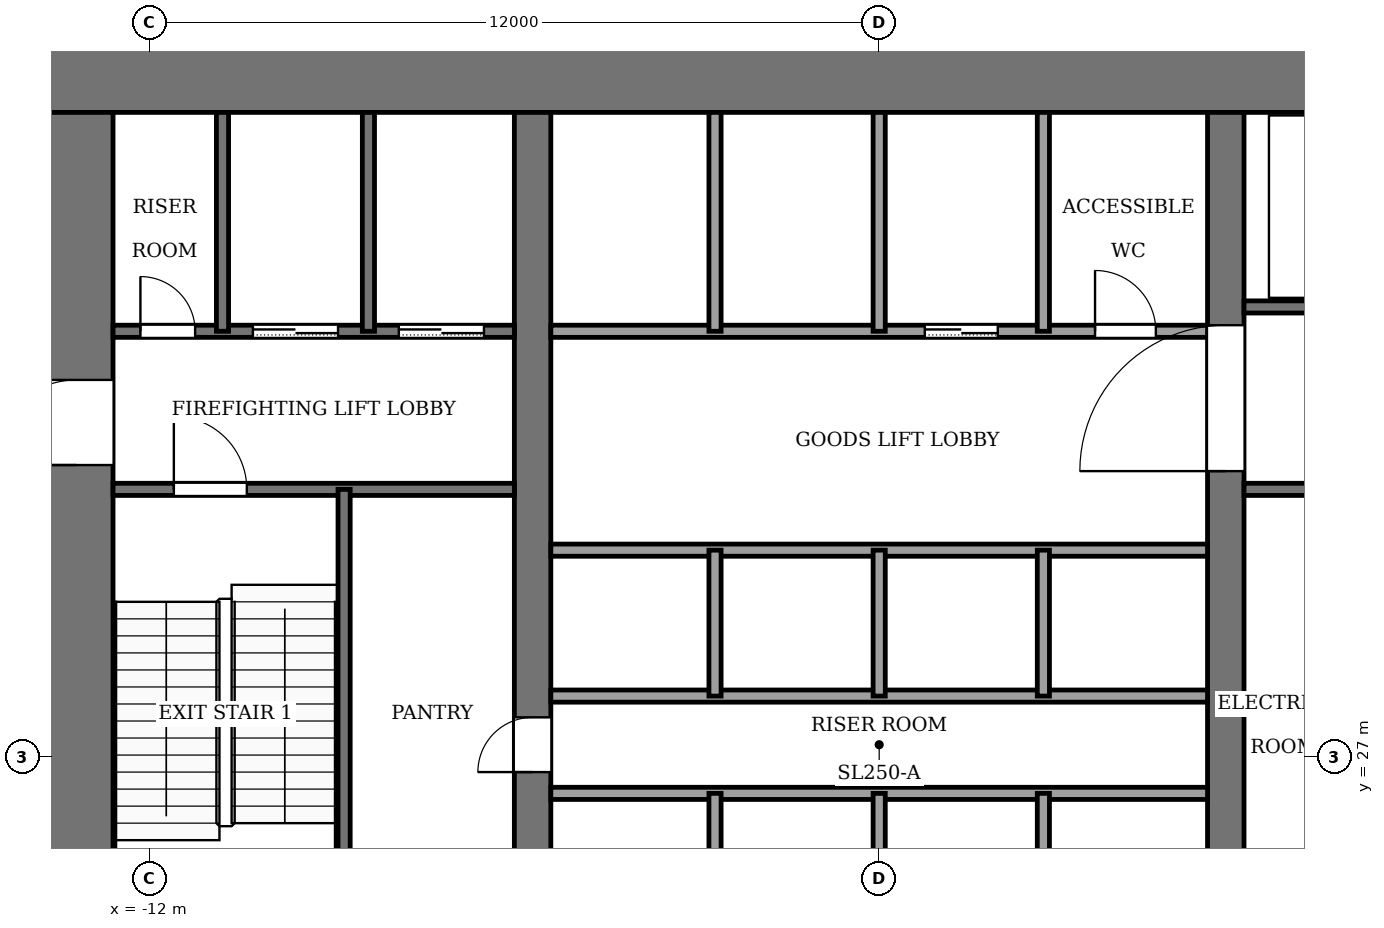
"""IFC4 building model, lengths in metres.
Left out: names, types, materials, properties, quantities, classifications, styles, units other than length and angle.
Written with IfcOpenShell. Run it as: python <this file> out.ifc"""

import sys

from ifc_helpers import new_model, si_unit, direction, frame, frame_2d, origin, place, context, subcontext, project, spatial, rectangle, extrude, element, fill, save


model = new_model("IFC4")
c1 = context("Model", 3, precision=1e-05, world=origin(), true_north=direction((0.0, 1.0)))
c2 = subcontext(c1, "Body", "Model", "MODEL_VIEW")
j1 = project(units=[si_unit("LENGTHUNIT", "METRE"), si_unit("PLANEANGLEUNIT", "RADIAN")], contexts=[c1])
p1 = place(None, origin())
s1 = spatial("IfcSite", under=j1, at=p1, CompositionType="ELEMENT")
p2 = place(p1, origin())
s2 = spatial("IfcBuilding", under=s1, at=p2, CompositionType="ELEMENT")
p3 = place(p2, frame((0.0, 0.0, 65.0)))
s3 = spatial("IfcBuildingStorey", under=s2, at=p3, CompositionType="ELEMENT", Elevation=65.0)
p4 = place(p3, frame((-13.8, 38.2, -0.13), z_axis=(0.0, 0.0, 1.0), x_axis=(1.0, 0.0, 0.0)))
e1 = element("IfcWall", 1, at=p4, inside=s3, PredefinedType="SHEAR", context=c2, shape_type="SweptSolid", body=[
    extrude(rectangle(XDim=27.6, YDim=1.2, at=frame_2d((13.8, 0.0))), origin(), (0.0, 0.0, 1.0), 5.0),
])
p5 = place(p3, frame((-13.2, 18.4, -0.13), z_axis=(0.0, 0.0, 1.0), x_axis=(0.0, 1.0, 0.0)))
e2 = element("IfcWall", 2, at=p5, inside=s3, PredefinedType="SHEAR", context=c2, shape_type="SweptSolid", body=[
    extrude(rectangle(XDim=19.2, YDim=1.2, at=frame_2d((9.6, 0.0))), origin(), (0.0, 0.0, 1.0), 5.0),
])
p6 = place(p5, frame((2.8, 0.0, 0.13)))
e3 = element("IfcOpeningElement", 3, at=p6, cuts=e2, PredefinedType="OPENING", context=c2, shape_type="SweptSolid", body=[
    extrude(rectangle(XDim=2.4, YDim=2.4, at=frame_2d((1.2, 1.2))), frame((0.0, 0.61, 0.0), z_axis=(0.0, -1.0, 0.0), x_axis=(1.0, 0.0, 0.0)), (0.0, 0.0, 1.0), 1.22),
])
p7 = place(p5, frame((13.4, 0.0, 0.13)))
e4 = element("IfcOpeningElement", 4, at=p7, cuts=e2, PredefinedType="OPENING", context=c2, shape_type="SweptSolid", body=[
    extrude(rectangle(XDim=1.4, YDim=2.2, at=frame_2d((0.7, 1.1))), frame((0.0, 0.61, 0.0), z_axis=(0.0, -1.0, 0.0), x_axis=(1.0, 0.0, 0.0)), (0.0, 0.0, 1.0), 1.22),
])
p8 = place(p3, frame((-5.7, 18.4, -0.13), z_axis=(0.0, 0.0, 1.0), x_axis=(0.0, 1.0, 0.0)))
e5 = element("IfcWall", 5, at=p8, inside=s3, PredefinedType="SHEAR", context=c2, shape_type="SweptSolid", body=[
    extrude(rectangle(XDim=19.2, YDim=0.6, at=frame_2d((9.6, 0.0))), origin(), (0.0, 0.0, 1.0), 5.0),
])
p9 = place(p8, frame((8.35, 0.0, 0.13)))
e6 = element("IfcOpeningElement", 6, at=p9, cuts=e5, PredefinedType="OPENING", context=c2, shape_type="SweptSolid", body=[
    extrude(rectangle(XDim=0.9, YDim=2.1, at=frame_2d((0.45, 1.05))), frame((0.0, 0.31, 0.0), z_axis=(0.0, -1.0, 0.0), x_axis=(1.0, 0.0, 0.0)), (0.0, 0.0, 1.0), 0.62),
])
p10 = place(p3, frame((5.7, 18.4, -0.13), z_axis=(0.0, 0.0, 1.0), x_axis=(0.0, 1.0, 0.0)))
e7 = element("IfcWall", 7, at=p10, inside=s3, PredefinedType="SHEAR", context=c2, shape_type="SweptSolid", body=[
    extrude(rectangle(XDim=19.2, YDim=0.6, at=frame_2d((9.6, 0.0))), origin(), (0.0, 0.0, 1.0), 5.0),
])
p11 = place(p10, frame((13.3, 0.0, 0.13)))
e8 = element("IfcOpeningElement", 8, at=p11, cuts=e7, PredefinedType="OPENING", context=c2, shape_type="SweptSolid", body=[
    extrude(rectangle(XDim=2.4, YDim=2.4, at=frame_2d((1.2, 1.2))), frame((0.0, 0.31, 0.0), z_axis=(0.0, -1.0, 0.0), x_axis=(1.0, 0.0, 0.0)), (0.0, 0.0, 1.0), 0.62),
])
for number, where, z_axis, x_axis in (
    (9, (-5.4, 26.4, 0.0), (0.0, 0.0, 1.0), (1.0, 0.0, 0.0)),
    (10, (-5.4, 28.0, 0.0), (0.0, 0.0, 1.0), (1.0, 0.0, 0.0)),
    (11, (-5.4, 30.4, 0.0), (0.0, 0.0, 1.0), (1.0, 0.0, 0.0)),
):
    element("IfcWall", number, at=place(p3, frame(where, z_axis=z_axis, x_axis=x_axis)), inside=s3, PredefinedType="PARTITIONING", context=c2, shape_type="SweptSolid", body=[
        extrude(rectangle(XDim=10.8, YDim=0.2, at=frame_2d((5.4, 0.0))), origin(), (0.0, 0.0, 1.0), 4.87),
    ])
p12 = place(p3, frame((-12.6, 31.4, 0.0), z_axis=(0.0, 0.0, 1.0), x_axis=(1.0, 0.0, 0.0)))
e12 = element("IfcWall", 12, at=p12, inside=s3, PredefinedType="PARTITIONING", context=c2, shape_type="SweptSolid", body=[
    extrude(rectangle(XDim=6.6, YDim=0.2, at=frame_2d((3.3, 0.0))), origin(), (0.0, 0.0, 1.0), 4.87),
])
p13 = place(p12, frame((1.0, 0.0, 0.0)))
e13 = element("IfcOpeningElement", 13, at=p13, cuts=e12, PredefinedType="OPENING", context=c2, shape_type="SweptSolid", body=[
    extrude(rectangle(XDim=1.2, YDim=2.2, at=frame_2d((0.6, 1.1))), frame((0.0, 0.11, 0.0), z_axis=(0.0, -1.0, 0.0), x_axis=(1.0, 0.0, 0.0)), (0.0, 0.0, 1.0), 0.22),
])
p14 = place(p3, frame((6.0, 31.4, 0.0), z_axis=(0.0, 0.0, 1.0), x_axis=(1.0, 0.0, 0.0)))
e14 = element("IfcWall", 14, at=p14, inside=s3, PredefinedType="PARTITIONING", context=c2, shape_type="SweptSolid", body=[
    extrude(rectangle(XDim=6.6, YDim=0.2, at=frame_2d((3.3, 0.0))), origin(), (0.0, 0.0, 1.0), 4.87),
])
p15 = place(p3, frame((-12.6, 34.0, 0.0), z_axis=(0.0, 0.0, 1.0), x_axis=(1.0, 0.0, 0.0)))
e15 = element("IfcWall", 15, at=p15, inside=s3, PredefinedType="PARTITIONING", context=c2, shape_type="SweptSolid", body=[
    extrude(rectangle(XDim=6.6, YDim=0.2, at=frame_2d((3.3, 0.0))), origin(), (0.0, 0.0, 1.0), 4.87),
])
p16 = place(p15, frame((4.7, 0.0, 0.0)))
e16 = element("IfcOpeningElement", 16, at=p16, cuts=e15, PredefinedType="OPENING", context=c2, shape_type="SweptSolid", body=[
    extrude(rectangle(XDim=1.4, YDim=2.2, at=frame_2d((0.7, 1.1))), frame((0.0, 0.11, 0.0), z_axis=(0.0, -1.0, 0.0), x_axis=(1.0, 0.0, 0.0)), (0.0, 0.0, 1.0), 0.22),
])
p17 = place(p15, frame((2.3, 0.0, 0.0)))
e17 = element("IfcOpeningElement", 17, at=p17, cuts=e15, PredefinedType="OPENING", context=c2, shape_type="SweptSolid", body=[
    extrude(rectangle(XDim=1.4, YDim=2.2, at=frame_2d((0.7, 1.1))), frame((0.0, 0.11, 0.0), z_axis=(0.0, -1.0, 0.0), x_axis=(1.0, 0.0, 0.0)), (0.0, 0.0, 1.0), 0.22),
])
p18 = place(p15, frame((0.45, 0.0, 0.0)))
e18 = element("IfcOpeningElement", 18, at=p18, cuts=e15, PredefinedType="OPENING", context=c2, shape_type="SweptSolid", body=[
    extrude(rectangle(XDim=0.9, YDim=2.1, at=frame_2d((0.45, 1.05))), frame((0.0, 0.11, 0.0), z_axis=(0.0, -1.0, 0.0), x_axis=(1.0, 0.0, 0.0)), (0.0, 0.0, 1.0), 0.22),
])
p19 = place(p3, frame((-5.4, 34.0, 0.0), z_axis=(0.0, 0.0, 1.0), x_axis=(1.0, 0.0, 0.0)))
e19 = element("IfcWall", 19, at=p19, inside=s3, PredefinedType="PARTITIONING", context=c2, shape_type="SweptSolid", body=[
    extrude(rectangle(XDim=10.8, YDim=0.2, at=frame_2d((5.4, 0.0))), origin(), (0.0, 0.0, 1.0), 4.87),
])
p20 = place(p19, frame((6.15, 0.0, 0.0)))
e20 = element("IfcOpeningElement", 20, at=p20, cuts=e19, PredefinedType="OPENING", context=c2, shape_type="SweptSolid", body=[
    extrude(rectangle(XDim=1.2, YDim=2.2, at=frame_2d((0.6, 1.1))), frame((0.0, 0.11, 0.0), z_axis=(0.0, -1.0, 0.0), x_axis=(1.0, 0.0, 0.0)), (0.0, 0.0, 1.0), 0.22),
])
p21 = place(p19, frame((8.95, 0.0, 0.0)))
e21 = element("IfcOpeningElement", 21, at=p21, cuts=e19, PredefinedType="OPENING", context=c2, shape_type="SweptSolid", body=[
    extrude(rectangle(XDim=1.0, YDim=2.1, at=frame_2d((0.5, 1.05))), frame((0.0, 0.11, 0.0), z_axis=(0.0, -1.0, 0.0), x_axis=(1.0, 0.0, 0.0)), (0.0, 0.0, 1.0), 0.22),
])
p22 = place(p3, frame((6.0, 34.4, 0.0), z_axis=(0.0, 0.0, 1.0), x_axis=(1.0, 0.0, 0.0)))
e22 = element("IfcWall", 22, at=p22, inside=s3, PredefinedType="PARTITIONING", context=c2, shape_type="SweptSolid", body=[
    extrude(rectangle(XDim=6.6, YDim=0.2, at=frame_2d((3.3, 0.0))), origin(), (0.0, 0.0, 1.0), 4.87),
])
p23 = place(p22, frame((4.8, 0.0, 0.0)))
e23 = element("IfcOpeningElement", 23, at=p23, cuts=e22, PredefinedType="OPENING", context=c2, shape_type="SweptSolid", body=[
    extrude(rectangle(XDim=1.2, YDim=2.2, at=frame_2d((0.6, 1.1))), frame((0.0, 0.11, 0.0), z_axis=(0.0, -1.0, 0.0), x_axis=(1.0, 0.0, 0.0)), (0.0, 0.0, 1.0), 0.22),
])
p24 = place(p3, frame((-10.8, 34.0, 0.0), z_axis=(0.0, 0.0, 1.0), x_axis=(0.0, 1.0, 0.0)))
e24 = element("IfcWall", 24, at=p24, inside=s3, PredefinedType="PARTITIONING", context=c2, shape_type="SweptSolid", body=[
    extrude(rectangle(XDim=3.6, YDim=0.2, at=frame_2d((1.8, 0.0))), origin(), (0.0, 0.0, 1.0), 4.87),
])
p25 = place(p3, frame((-8.8, 24.0, 0.0), z_axis=(0.0, 0.0, 1.0), x_axis=(0.0, 1.0, 0.0)))
e25 = element("IfcWall", 25, at=p25, inside=s3, PredefinedType="PARTITIONING", context=c2, shape_type="SweptSolid", body=[
    extrude(rectangle(XDim=7.4, YDim=0.2, at=frame_2d((3.7, 0.0))), origin(), (0.0, 0.0, 1.0), 4.87),
])
p26 = place(p3, frame((-8.4, 34.0, 0.0), z_axis=(0.0, 0.0, 1.0), x_axis=(0.0, 1.0, 0.0)))
e26 = element("IfcWall", 26, at=p26, inside=s3, PredefinedType="PARTITIONING", context=c2, shape_type="SweptSolid", body=[
    extrude(rectangle(XDim=3.6, YDim=0.2, at=frame_2d((1.8, 0.0))), origin(), (0.0, 0.0, 1.0), 4.87),
])
for number, where, z_axis, x_axis in (
    (27, (-2.7, 24.0, 0.0), (0.0, 0.0, 1.0), (0.0, 1.0, 0.0)),
    (28, (-2.7, 28.0, 0.0), (0.0, 0.0, 1.0), (0.0, 1.0, 0.0)),
):
    element("IfcWall", number, at=place(p3, frame(where, z_axis=z_axis, x_axis=x_axis)), inside=s3, PredefinedType="PARTITIONING", context=c2, shape_type="SweptSolid", body=[
        extrude(rectangle(XDim=2.4, YDim=0.2, at=frame_2d((1.2, 0.0))), origin(), (0.0, 0.0, 1.0), 4.87),
    ])
p27 = place(p3, frame((-2.7, 34.0, 0.0), z_axis=(0.0, 0.0, 1.0), x_axis=(0.0, 1.0, 0.0)))
e29 = element("IfcWall", 29, at=p27, inside=s3, PredefinedType="PARTITIONING", context=c2, shape_type="SweptSolid", body=[
    extrude(rectangle(XDim=3.6, YDim=0.2, at=frame_2d((1.8, 0.0))), origin(), (0.0, 0.0, 1.0), 4.87),
])
for number, where, z_axis, x_axis in (
    (30, (0.0, 24.0, 0.0), (0.0, 0.0, 1.0), (0.0, 1.0, 0.0)),
    (31, (0.0, 28.0, 0.0), (0.0, 0.0, 1.0), (0.0, 1.0, 0.0)),
):
    element("IfcWall", number, at=place(p3, frame(where, z_axis=z_axis, x_axis=x_axis)), inside=s3, PredefinedType="PARTITIONING", context=c2, shape_type="SweptSolid", body=[
        extrude(rectangle(XDim=2.4, YDim=0.2, at=frame_2d((1.2, 0.0))), origin(), (0.0, 0.0, 1.0), 4.87),
    ])
p28 = place(p3, frame((0.0, 34.0, 0.0), z_axis=(0.0, 0.0, 1.0), x_axis=(0.0, 1.0, 0.0)))
e32 = element("IfcWall", 32, at=p28, inside=s3, PredefinedType="PARTITIONING", context=c2, shape_type="SweptSolid", body=[
    extrude(rectangle(XDim=3.6, YDim=0.2, at=frame_2d((1.8, 0.0))), origin(), (0.0, 0.0, 1.0), 4.87),
])
for number, where, z_axis, x_axis in (
    (33, (2.7, 24.0, 0.0), (0.0, 0.0, 1.0), (0.0, 1.0, 0.0)),
    (34, (2.7, 28.0, 0.0), (0.0, 0.0, 1.0), (0.0, 1.0, 0.0)),
):
    element("IfcWall", number, at=place(p3, frame(where, z_axis=z_axis, x_axis=x_axis)), inside=s3, PredefinedType="PARTITIONING", context=c2, shape_type="SweptSolid", body=[
        extrude(rectangle(XDim=2.4, YDim=0.2, at=frame_2d((1.2, 0.0))), origin(), (0.0, 0.0, 1.0), 4.87),
    ])
p29 = place(p3, frame((2.7, 34.0, 0.0), z_axis=(0.0, 0.0, 1.0), x_axis=(0.0, 1.0, 0.0)))
e35 = element("IfcWall", 35, at=p29, inside=s3, PredefinedType="PARTITIONING", context=c2, shape_type="SweptSolid", body=[
    extrude(rectangle(XDim=3.6, YDim=0.2, at=frame_2d((1.8, 0.0))), origin(), (0.0, 0.0, 1.0), 4.87),
])
p30 = place(p20, origin())
e36 = element("IfcDoor", 36, at=p30, inside=s3, OperationType="SLIDING_TO_LEFT", PredefinedType="DOOR", context=c2, shape_type="SweptSolid", body=[
    extrude(rectangle(XDim=1.2, YDim=2.2, at=frame_2d((0.6, 1.1))), frame((0.0, 0.025, 0.0), z_axis=(0.0, -1.0, 0.0), x_axis=(1.0, 0.0, 0.0)), (0.0, 0.0, 1.0), 0.05),
])
fill(e20, e36)
p31 = place(p16, origin())
e37 = element("IfcDoor", 37, at=p31, inside=s3, OperationType="SLIDING_TO_LEFT", PredefinedType="DOOR", context=c2, shape_type="SweptSolid", body=[
    extrude(rectangle(XDim=1.4, YDim=2.2, at=frame_2d((0.7, 1.1))), frame((0.0, 0.025, 0.0), z_axis=(0.0, -1.0, 0.0), x_axis=(1.0, 0.0, 0.0)), (0.0, 0.0, 1.0), 0.05),
])
fill(e16, e37)
p32 = place(p17, origin())
e38 = element("IfcDoor", 38, at=p32, inside=s3, OperationType="SLIDING_TO_LEFT", PredefinedType="DOOR", context=c2, shape_type="SweptSolid", body=[
    extrude(rectangle(XDim=1.4, YDim=2.2, at=frame_2d((0.7, 1.1))), frame((0.0, 0.025, 0.0), z_axis=(0.0, -1.0, 0.0), x_axis=(1.0, 0.0, 0.0)), (0.0, 0.0, 1.0), 0.05),
])
fill(e17, e38)
p33 = place(p18, origin())
e39 = element("IfcDoor", 39, at=p33, inside=s3, OperationType="SINGLE_SWING_RIGHT", PredefinedType="DOOR", context=c2, shape_type="SweptSolid", body=[
    extrude(rectangle(XDim=0.9, YDim=2.1, at=frame_2d((0.45, 1.05))), frame((0.0, 0.025, 0.0), z_axis=(0.0, -1.0, 0.0), x_axis=(1.0, 0.0, 0.0)), (0.0, 0.0, 1.0), 0.05),
])
fill(e18, e39)
p34 = place(p21, origin())
e40 = element("IfcDoor", 40, at=p34, inside=s3, OperationType="SINGLE_SWING_LEFT", PredefinedType="DOOR", context=c2, shape_type="SweptSolid", body=[
    extrude(rectangle(XDim=1.0, YDim=2.1, at=frame_2d((0.5, 1.05))), frame((0.0, 0.025, 0.0), z_axis=(0.0, -1.0, 0.0), x_axis=(1.0, 0.0, 0.0)), (0.0, 0.0, 1.0), 0.05),
])
fill(e21, e40)
p35 = place(p9, origin())
e41 = element("IfcDoor", 41, at=p35, inside=s3, OperationType="SINGLE_SWING_LEFT", PredefinedType="DOOR", context=c2, shape_type="SweptSolid", body=[
    extrude(rectangle(XDim=0.9, YDim=2.1, at=frame_2d((0.45, 1.05))), frame((0.0, 0.025, 0.0), z_axis=(0.0, -1.0, 0.0), x_axis=(1.0, 0.0, 0.0)), (0.0, 0.0, 1.0), 0.05),
])
fill(e6, e41)
p36 = place(p13, origin())
e42 = element("IfcDoor", 42, at=p36, inside=s3, OperationType="SINGLE_SWING_LEFT", PredefinedType="DOOR", context=c2, shape_type="SweptSolid", body=[
    extrude(rectangle(XDim=1.2, YDim=2.2, at=frame_2d((0.6, 1.1))), frame((0.0, 0.025, 0.0), z_axis=(0.0, -1.0, 0.0), x_axis=(1.0, 0.0, 0.0)), (0.0, 0.0, 1.0), 0.05),
])
fill(e13, e42)
p37 = place(p11, origin())
e43 = element("IfcDoor", 43, at=p37, inside=s3, OperationType="DOUBLE_DOOR_SINGLE_SWING", PredefinedType="DOOR", context=c2, shape_type="SweptSolid", body=[
    extrude(rectangle(XDim=2.4, YDim=2.4, at=frame_2d((1.2, 1.2))), frame((0.0, 0.025, 0.0), z_axis=(0.0, -1.0, 0.0), x_axis=(1.0, 0.0, 0.0)), (0.0, 0.0, 1.0), 0.05),
])
fill(e8, e43)
p38 = place(p7, origin())
e44 = element("IfcDoor", 44, at=p38, inside=s3, OperationType="SINGLE_SWING_LEFT", PredefinedType="DOOR", context=c2, shape_type="SweptSolid", body=[
    extrude(rectangle(XDim=1.4, YDim=2.2, at=frame_2d((0.7, 1.1))), frame((0.0, 0.025, 0.0), z_axis=(0.0, -1.0, 0.0), x_axis=(1.0, 0.0, 0.0)), (0.0, 0.0, 1.0), 0.05),
])
fill(e4, e44)
save(model, sys.argv[1])
